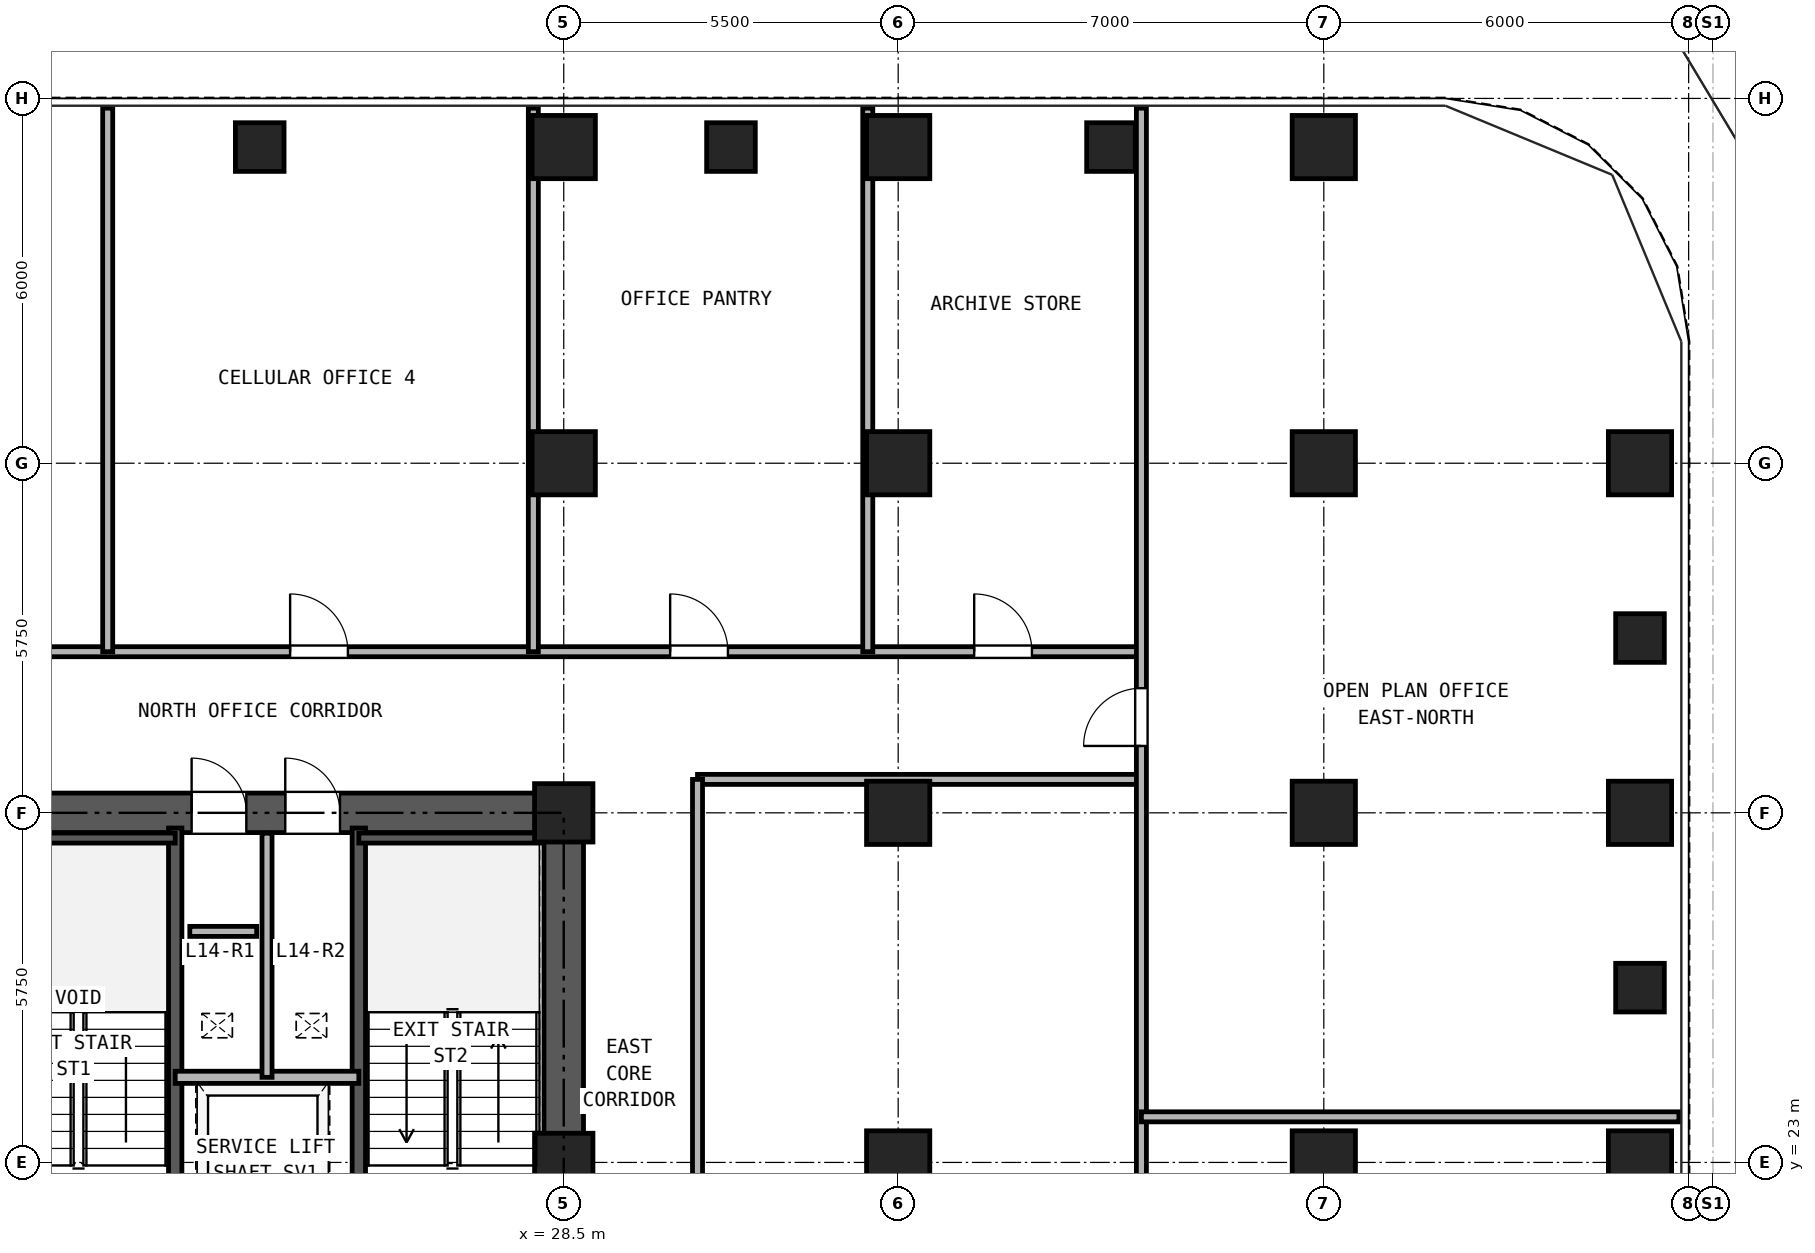
"""IFC4 building model, lengths in metres.
Left out: names, types, materials, properties, quantities, classifications, styles, units other than length and angle.
Written with IfcOpenShell. Run it as: python <this file> out.ifc"""

import sys

from ifc_helpers import new_model, si_unit, direction, frame, frame_2d, origin, origin_2d, place, context, subcontext, project, spatial, rectangle, hollow_rectangle, extrude, source, transform, mapped, element, fill, save


model = new_model("IFC4")
c1 = context("Model", 3, precision=1e-05, world=origin(), true_north=direction((0.0, 1.0)))
c2 = subcontext(c1, "Body", "Model", "MODEL_VIEW")
j1 = project(units=[si_unit("LENGTHUNIT", "METRE"), si_unit("PLANEANGLEUNIT", "RADIAN")], contexts=[c1])
p1 = place(None, origin())
s1 = spatial("IfcSite", under=j1, at=p1, CompositionType="ELEMENT")
p2 = place(p1, origin())
s2 = spatial("IfcBuilding", under=s1, at=p2, CompositionType="ELEMENT")
p3 = place(p2, frame((0.0, 0.0, 54.9)))
s3 = spatial("IfcBuildingStorey", under=s2, at=p3, CompositionType="ELEMENT", Elevation=54.9)
m1 = source(origin(), c2, "Body", "SweptSolid", [
    extrude(hollow_rectangle(XDim=1.04, YDim=1.04, WallThickness=0.065, at=origin_2d()), origin(), (0.0, 0.0, 1.0), 3.32),
])
for number, where, z_axis, x_axis in (
    (1, (28.5, 39.7, 0.0), (0.0, 0.0, 1.0), (1.0, 0.0, 0.0)),
    (2, (34.0, 39.7, 0.0), (0.0, 0.0, 1.0), (1.0, 0.0, 0.0)),
    (3, (41.0, 39.7, 0.0), (0.0, 0.0, 1.0), (1.0, 0.0, 0.0)),
    (4, (46.2, 23.0, 0.0), (0.0, 0.0, 1.0), (1.0, 0.0, 0.0)),
    (5, (46.2, 28.75, 0.0), (0.0, 0.0, 1.0), (1.0, 0.0, 0.0)),
    (6, (46.2, 34.5, 0.0), (0.0, 0.0, 1.0), (1.0, 0.0, 0.0)),
):
    element("IfcColumn", number, at=place(p3, frame(where, z_axis=z_axis, x_axis=x_axis)), inside=s3, PredefinedType="COLUMN", context=c2, shape_type="MappedRepresentation", body=[
        mapped(m1, transform((0.0, 0.0, 0.0), x_axis=(1.0, 0.0, 0.0), y_axis=(0.0, 1.0, 0.0), z_axis=(0.0, 0.0, 1.0), scale=1.0)),
    ])
m2 = source(origin(), c2, "Body", "SweptSolid", [
    extrude(hollow_rectangle(XDim=0.96, YDim=0.96, WallThickness=0.06, at=origin_2d()), origin(), (0.0, 0.0, 1.0), 3.32),
])
for number, where, z_axis, x_axis in (
    (7, (28.5, 23.0, 0.0), (0.0, 0.0, 1.0), (1.0, 0.0, 0.0)),
    (8, (28.5, 28.75, 0.0), (0.0, 0.0, 1.0), (1.0, 0.0, 0.0)),
):
    element("IfcColumn", number, at=place(p3, frame(where, z_axis=z_axis, x_axis=x_axis)), inside=s3, PredefinedType="COLUMN", context=c2, shape_type="MappedRepresentation", body=[
        mapped(m2, transform((0.0, 0.0, 0.0), x_axis=(1.0, 0.0, 0.0), y_axis=(0.0, 1.0, 0.0), z_axis=(0.0, 0.0, 1.0), scale=1.0)),
    ])
for number, where, z_axis, x_axis in (
    (9, (28.5, 34.5, 0.0), (0.0, 0.0, 1.0), (1.0, 0.0, 0.0)),
    (10, (34.0, 23.0, 0.0), (0.0, 0.0, 1.0), (1.0, 0.0, 0.0)),
    (11, (34.0, 28.75, 0.0), (0.0, 0.0, 1.0), (1.0, 0.0, 0.0)),
    (12, (34.0, 34.5, 0.0), (0.0, 0.0, 1.0), (1.0, 0.0, 0.0)),
    (13, (41.0, 23.0, 0.0), (0.0, 0.0, 1.0), (1.0, 0.0, 0.0)),
    (14, (41.0, 28.75, 0.0), (0.0, 0.0, 1.0), (1.0, 0.0, 0.0)),
    (15, (41.0, 34.5, 0.0), (0.0, 0.0, 1.0), (1.0, 0.0, 0.0)),
):
    element("IfcColumn", number, at=place(p3, frame(where, z_axis=z_axis, x_axis=x_axis)), inside=s3, PredefinedType="COLUMN", context=c2, shape_type="MappedRepresentation", body=[
        mapped(m1, transform((0.0, 0.0, 0.0), x_axis=(1.0, 0.0, 0.0), y_axis=(0.0, 1.0, 0.0), z_axis=(0.0, 0.0, 1.0), scale=1.0)),
    ])
m3 = source(origin(), c2, "Body", "SweptSolid", [
    extrude(hollow_rectangle(XDim=0.8, YDim=0.8, WallThickness=0.045, at=origin_2d()), origin(), (0.0, 0.0, 1.0), 3.32),
])
for number, where, z_axis, x_axis in (
    (16, (23.5, 39.7, 0.0), (0.0, 0.0, 1.0), (1.0, 0.0, 0.0)),
    (17, (31.25, 39.7, 0.0), (0.0, 0.0, 1.0), (1.0, 0.0, 0.0)),
    (18, (37.5, 39.7, 0.0), (0.0, 0.0, 1.0), (1.0, 0.0, 0.0)),
    (19, (46.2, 25.875, 0.0), (0.0, 0.0, 1.0), (1.0, 0.0, 0.0)),
    (20, (46.2, 31.625, 0.0), (0.0, 0.0, 1.0), (1.0, 0.0, 0.0)),
):
    element("IfcColumn", number, at=place(p3, frame(where, z_axis=z_axis, x_axis=x_axis)), inside=s3, PredefinedType="COLUMN", context=c2, shape_type="MappedRepresentation", body=[
        mapped(m3, transform((0.0, 0.0, 0.0), x_axis=(1.0, 0.0, 0.0), y_axis=(0.0, 1.0, 0.0), z_axis=(0.0, 0.0, 1.0), scale=1.0)),
    ])
p4 = place(p3, frame((18.175, 28.75, 0.0), z_axis=(0.0, 0.0, 1.0), x_axis=(1.0, 0.0, 0.0)))
e21 = element("IfcWall", 21, at=p4, inside=s3, PredefinedType="SHEAR", context=c2, shape_type="SweptSolid", body=[
    extrude(rectangle(XDim=10.65, YDim=0.65, at=frame_2d((5.325, 0.0))), origin(), (0.0, 0.0, 1.0), 3.32),
])
p5 = place(p4, frame((4.205, 0.0, 0.0)))
e22 = element("IfcOpeningElement", 22, at=p5, cuts=e21, PredefinedType="OPENING", context=c2, shape_type="SweptSolid", body=[
    extrude(rectangle(XDim=0.9, YDim=2.05, at=frame_2d((0.45, 1.025))), frame((0.0, 0.335, 0.0), z_axis=(0.0, -1.0, 0.0), x_axis=(1.0, 0.0, 0.0)), (0.0, 0.0, 1.0), 0.67),
])
p6 = place(p4, frame((5.745, 0.0, 0.0)))
e23 = element("IfcOpeningElement", 23, at=p6, cuts=e21, PredefinedType="OPENING", context=c2, shape_type="SweptSolid", body=[
    extrude(rectangle(XDim=0.9, YDim=2.05, at=frame_2d((0.45, 1.025))), frame((0.0, 0.335, 0.0), z_axis=(0.0, -1.0, 0.0), x_axis=(1.0, 0.0, 0.0)), (0.0, 0.0, 1.0), 0.67),
])
p7 = place(p3, frame((28.5, 11.825, 0.0), z_axis=(0.0, 0.0, 1.0), x_axis=(0.0, 1.0, 0.0)))
e24 = element("IfcWall", 24, at=p7, inside=s3, PredefinedType="SHEAR", context=c2, shape_type="SweptSolid", body=[
    extrude(rectangle(XDim=16.6, YDim=0.65, at=frame_2d((8.3, 0.0))), origin(), (0.0, 0.0, 1.0), 3.32),
])
p8 = place(p7, frame((7.325, 0.0, 0.0)))
e25 = element("IfcOpeningElement", 25, at=p8, cuts=e24, PredefinedType="OPENING", context=c2, shape_type="SweptSolid", body=[
    extrude(rectangle(XDim=1.15, YDim=2.2, at=frame_2d((0.575, 1.1))), frame((0.0, 0.335, 0.0), z_axis=(0.0, -1.0, 0.0), x_axis=(1.0, 0.0, 0.0)), (0.0, 0.0, 1.0), 0.67),
])
for number, where, z_axis, x_axis in (
    (26, (22.11, 21.39, 0.0), (0.0, 0.0, 1.0), (0.0, 1.0, 0.0)),
    (27, (25.13, 21.39, 0.0), (0.0, 0.0, 1.0), (0.0, 1.0, 0.0)),
):
    element("IfcWall", number, at=place(p3, frame(where, z_axis=z_axis, x_axis=x_axis)), inside=s3, PredefinedType="SOLIDWALL", context=c2, shape_type="SweptSolid", body=[
        extrude(rectangle(XDim=7.11, YDim=0.22, at=frame_2d((3.555, 0.0))), origin(), (0.0, 0.0, 1.0), 3.32),
    ])
p9 = place(p3, frame((18.835, 28.335, 0.0), z_axis=(0.0, 0.0, 1.0), x_axis=(1.0, 0.0, 0.0)))
e28 = element("IfcWall", 28, at=p9, inside=s3, PredefinedType="PARTITIONING", context=c2, shape_type="SweptSolid", body=[
    extrude(rectangle(XDim=3.275, YDim=0.165, at=frame_2d((1.638, 0.0))), origin(), (0.0, 0.0, 1.0), 3.32),
])
p10 = place(p3, frame((25.13, 28.335, 0.0), z_axis=(0.0, 0.0, 1.0), x_axis=(1.0, 0.0, 0.0)))
e29 = element("IfcWall", 29, at=p10, inside=s3, PredefinedType="PARTITIONING", context=c2, shape_type="SweptSolid", body=[
    extrude(rectangle(XDim=3.035, YDim=0.165, at=frame_2d((1.518, 0.0))), origin(), (0.0, 0.0, 1.0), 3.32),
])
p11 = place(p3, frame((22.11, 24.4, 0.0), z_axis=(0.0, 0.0, 1.0), x_axis=(1.0, 0.0, 0.0)))
e30 = element("IfcWall", 30, at=p11, inside=s3, PredefinedType="PARTITIONING", context=c2, shape_type="SweptSolid", body=[
    extrude(rectangle(XDim=3.02, YDim=0.2, at=frame_2d((1.51, 0.0))), origin(), (0.0, 0.0, 1.0), 3.32),
])
p12 = place(p3, frame((23.62, 24.4, 0.0), z_axis=(0.0, 0.0, 1.0), x_axis=(0.0, 1.0, 0.0)))
e31 = element("IfcWall", 31, at=p12, inside=s3, PredefinedType="PARTITIONING", context=c2, shape_type="SweptSolid", body=[
    extrude(rectangle(XDim=4.015, YDim=0.165, at=frame_2d((2.008, 0.0))), origin(), (0.0, 0.0, 1.0), 3.32),
])
p13 = place(p3, frame((9.0, 31.4, 0.0), z_axis=(0.0, 0.0, 1.0), x_axis=(1.0, 0.0, 0.0)))
e32 = element("IfcWall", 32, at=p13, inside=s3, PredefinedType="PARTITIONING", context=c2, shape_type="SweptSolid", body=[
    extrude(rectangle(XDim=29.0, YDim=0.165, at=frame_2d((14.5, 0.0))), origin(), (0.0, 0.0, 1.0), 2.898),
])
p14 = place(p13, frame((5.5, 0.0, 0.0)))
e33 = element("IfcOpeningElement", 33, at=p14, cuts=e32, PredefinedType="OPENING", context=c2, shape_type="SweptSolid", body=[
    extrude(rectangle(XDim=0.95, YDim=2.15, at=frame_2d((0.475, 1.075))), frame((0.0, 0.093, 0.0), z_axis=(0.0, -1.0, 0.0), x_axis=(1.0, 0.0, 0.0)), (0.0, 0.0, 1.0), 0.185),
])
p15 = place(p13, frame((15.0, 0.0, 0.0)))
e34 = element("IfcOpeningElement", 34, at=p15, cuts=e32, PredefinedType="OPENING", context=c2, shape_type="SweptSolid", body=[
    extrude(rectangle(XDim=0.95, YDim=2.15, at=frame_2d((0.475, 1.075))), frame((0.0, 0.093, 0.0), z_axis=(0.0, -1.0, 0.0), x_axis=(1.0, 0.0, 0.0)), (0.0, 0.0, 1.0), 0.185),
])
p16 = place(p13, frame((21.25, 0.0, 0.0)))
e35 = element("IfcOpeningElement", 35, at=p16, cuts=e32, PredefinedType="OPENING", context=c2, shape_type="SweptSolid", body=[
    extrude(rectangle(XDim=0.95, YDim=2.15, at=frame_2d((0.475, 1.075))), frame((0.0, 0.093, 0.0), z_axis=(0.0, -1.0, 0.0), x_axis=(1.0, 0.0, 0.0)), (0.0, 0.0, 1.0), 0.185),
])
p17 = place(p13, frame((26.25, 0.0, 0.0)))
e36 = element("IfcOpeningElement", 36, at=p17, cuts=e32, PredefinedType="OPENING", context=c2, shape_type="SweptSolid", body=[
    extrude(rectangle(XDim=0.95, YDim=2.15, at=frame_2d((0.475, 1.075))), frame((0.0, 0.093, 0.0), z_axis=(0.0, -1.0, 0.0), x_axis=(1.0, 0.0, 0.0)), (0.0, 0.0, 1.0), 0.185),
])
p18 = place(p3, frame((30.7, 29.3, 0.0), z_axis=(0.0, 0.0, 1.0), x_axis=(1.0, 0.0, 0.0)))
e37 = element("IfcWall", 37, at=p18, inside=s3, PredefinedType="PARTITIONING", context=c2, shape_type="SweptSolid", body=[
    extrude(rectangle(XDim=7.3, YDim=0.165, at=frame_2d((3.65, 0.0))), origin(), (0.0, 0.0, 1.0), 3.32),
])
p19 = place(p3, frame((30.7, 11.05, 0.0), z_axis=(0.0, 0.0, 1.0), x_axis=(0.0, 1.0, 0.0)))
e38 = element("IfcWall", 38, at=p19, inside=s3, PredefinedType="PARTITIONING", context=c2, shape_type="SweptSolid", body=[
    extrude(rectangle(XDim=18.25, YDim=0.165, at=frame_2d((9.125, 0.0))), origin(), (0.0, 0.0, 1.0), 3.32),
])
p20 = place(p19, frame((8.625, 0.0, 0.0)))
e39 = element("IfcOpeningElement", 39, at=p20, cuts=e38, PredefinedType="OPENING", context=c2, shape_type="SweptSolid", body=[
    extrude(rectangle(XDim=0.95, YDim=2.15, at=frame_2d((0.475, 1.075))), frame((0.0, 0.093, 0.0), z_axis=(0.0, -1.0, 0.0), x_axis=(1.0, 0.0, 0.0)), (0.0, 0.0, 1.0), 0.185),
])
p21 = place(p3, frame((38.0, 0.16, 0.0), z_axis=(0.0, 0.0, 1.0), x_axis=(0.0, 1.0, 0.0)))
e40 = element("IfcWall", 40, at=p21, inside=s3, PredefinedType="PARTITIONING", context=c2, shape_type="SweptSolid", body=[
    extrude(rectangle(XDim=40.18, YDim=0.165, at=frame_2d((20.09, 0.0))), origin(), (0.0, 0.0, 1.0), 3.32),
])
p22 = place(p21, frame((9.34, 0.0, 0.0)))
e41 = element("IfcOpeningElement", 41, at=p22, cuts=e40, PredefinedType="OPENING", context=c2, shape_type="SweptSolid", body=[
    extrude(rectangle(XDim=0.95, YDim=2.15, at=frame_2d((0.475, 1.075))), frame((0.0, 0.093, 0.0), z_axis=(0.0, -1.0, 0.0), x_axis=(1.0, 0.0, 0.0)), (0.0, 0.0, 1.0), 0.185),
])
p23 = place(p21, frame((29.69, 0.0, 0.0)))
e42 = element("IfcOpeningElement", 42, at=p23, cuts=e40, PredefinedType="OPENING", context=c2, shape_type="SweptSolid", body=[
    extrude(rectangle(XDim=0.95, YDim=2.15, at=frame_2d((0.475, 1.075))), frame((0.0, 0.093, 0.0), z_axis=(0.0, -1.0, 0.0), x_axis=(1.0, 0.0, 0.0)), (0.0, 0.0, 1.0), 0.185),
])
for number, where, z_axis, x_axis in (
    (43, (21.0, 31.4, 0.0), (0.0, 0.0, 1.0), (0.0, 1.0, 0.0)),
    (44, (28.0, 31.4, 0.0), (0.0, 0.0, 1.0), (0.0, 1.0, 0.0)),
    (45, (33.5, 31.4, 0.0), (0.0, 0.0, 1.0), (0.0, 1.0, 0.0)),
):
    element("IfcWall", number, at=place(p3, frame(where, z_axis=z_axis, x_axis=x_axis)), inside=s3, PredefinedType="PARTITIONING", context=c2, shape_type="SweptSolid", body=[
        extrude(rectangle(XDim=8.94, YDim=0.165, at=frame_2d((4.47, 0.0))), origin(), (0.0, 0.0, 1.0), 3.32),
    ])
p24 = place(p3, frame((38.0, 23.75, 0.0), z_axis=(0.0, 0.0, 1.0), x_axis=(1.0, 0.0, 0.0)))
e46 = element("IfcWall", 46, at=p24, inside=s3, PredefinedType="PARTITIONING", context=c2, shape_type="SweptSolid", body=[
    extrude(rectangle(XDim=8.84, YDim=0.165, at=frame_2d((4.42, 0.0))), origin(), (0.0, 0.0, 1.0), 3.32),
])
p25 = place(p3, frame((22.35, 26.8, 0.0), z_axis=(0.0, 0.0, 1.0), x_axis=(1.0, 0.0, 0.0)))
e47 = element("IfcWall", 47, at=p25, inside=s3, PredefinedType="PARTITIONING", context=c2, shape_type="SweptSolid", body=[
    extrude(rectangle(XDim=1.1, YDim=0.165, at=frame_2d((0.55, 0.0))), origin(), (0.0, 0.0, 1.0), 3.32),
])
p26 = place(p5, origin())
e48 = element("IfcDoor", 48, at=p26, inside=s3, OperationType="SINGLE_SWING_LEFT", PredefinedType="DOOR", context=c2, shape_type="SweptSolid", body=[
    extrude(rectangle(XDim=0.9, YDim=2.05, at=frame_2d((0.45, 1.025))), frame((0.0, 0.025, 0.0), z_axis=(0.0, -1.0, 0.0), x_axis=(1.0, 0.0, 0.0)), (0.0, 0.0, 1.0), 0.05),
])
fill(e22, e48)
p27 = place(p6, origin())
e49 = element("IfcDoor", 49, at=p27, inside=s3, OperationType="SINGLE_SWING_LEFT", PredefinedType="DOOR", context=c2, shape_type="SweptSolid", body=[
    extrude(rectangle(XDim=0.9, YDim=2.05, at=frame_2d((0.45, 1.025))), frame((0.0, 0.025, 0.0), z_axis=(0.0, -1.0, 0.0), x_axis=(1.0, 0.0, 0.0)), (0.0, 0.0, 1.0), 0.05),
])
fill(e23, e49)
p28 = place(p15, origin())
e50 = element("IfcDoor", 50, at=p28, inside=s3, OperationType="SINGLE_SWING_LEFT", PredefinedType="DOOR", context=c2, shape_type="SweptSolid", body=[
    extrude(rectangle(XDim=0.95, YDim=2.15, at=frame_2d((0.475, 1.075))), frame((0.0, 0.025, 0.0), z_axis=(0.0, -1.0, 0.0), x_axis=(1.0, 0.0, 0.0)), (0.0, 0.0, 1.0), 0.05),
])
fill(e34, e50)
p29 = place(p16, origin())
e51 = element("IfcDoor", 51, at=p29, inside=s3, OperationType="SINGLE_SWING_LEFT", PredefinedType="DOOR", context=c2, shape_type="SweptSolid", body=[
    extrude(rectangle(XDim=0.95, YDim=2.15, at=frame_2d((0.475, 1.075))), frame((0.0, 0.025, 0.0), z_axis=(0.0, -1.0, 0.0), x_axis=(1.0, 0.0, 0.0)), (0.0, 0.0, 1.0), 0.05),
])
fill(e35, e51)
p30 = place(p17, origin())
e52 = element("IfcDoor", 52, at=p30, inside=s3, OperationType="SINGLE_SWING_LEFT", PredefinedType="DOOR", context=c2, shape_type="SweptSolid", body=[
    extrude(rectangle(XDim=0.95, YDim=2.15, at=frame_2d((0.475, 1.075))), frame((0.0, 0.025, 0.0), z_axis=(0.0, -1.0, 0.0), x_axis=(1.0, 0.0, 0.0)), (0.0, 0.0, 1.0), 0.05),
])
fill(e36, e52)
p31 = place(p23, origin())
e53 = element("IfcDoor", 53, at=p31, inside=s3, OperationType="SINGLE_SWING_LEFT", PredefinedType="DOOR", context=c2, shape_type="SweptSolid", body=[
    extrude(rectangle(XDim=0.95, YDim=2.15, at=frame_2d((0.475, 1.075))), frame((0.0, 0.025, 0.0), z_axis=(0.0, -1.0, 0.0), x_axis=(1.0, 0.0, 0.0)), (0.0, 0.0, 1.0), 0.05),
])
fill(e42, e53)
save(model, sys.argv[1])
